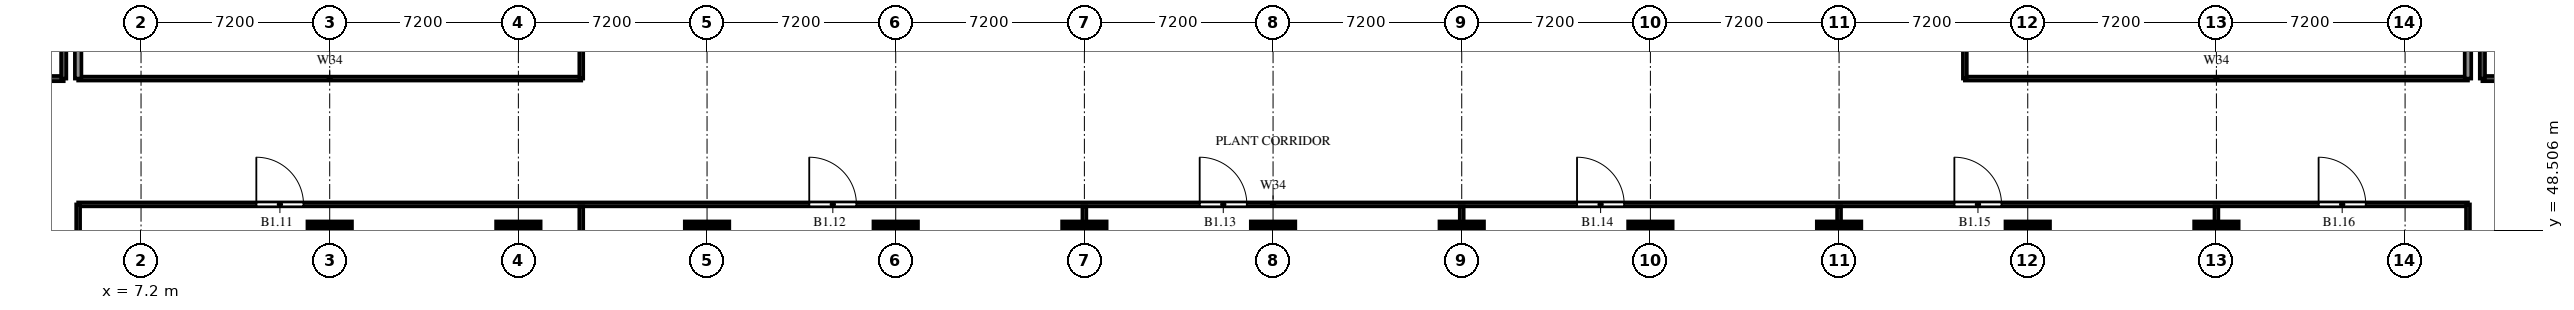
"""IFC4 building model, lengths in metres.
Left out: names, types, materials, properties, quantities, classifications, styles, units other than length and angle.
Written with IfcOpenShell. Run it as: python <this file> out.ifc"""

import sys

from ifc_helpers import new_model, si_unit, direction, frame, frame_2d, origin, origin_2d, place, context, subcontext, project, spatial, rectangle, extrude, source, transform, mapped, element, fill, save


model = new_model("IFC4")
c1 = context("Model", 3, precision=1e-05, world=origin(), true_north=direction((0.0, 1.0)))
c2 = subcontext(c1, "Body", "Model", "MODEL_VIEW")
j1 = project(units=[si_unit("LENGTHUNIT", "METRE"), si_unit("PLANEANGLEUNIT", "RADIAN")], contexts=[c1])
p1 = place(None, origin())
s1 = spatial("IfcSite", under=j1, at=p1, CompositionType="ELEMENT")
p2 = place(p1, origin())
s2 = spatial("IfcBuilding", under=s1, at=p2, CompositionType="ELEMENT")
p3 = place(p2, frame((0.0, 0.0, -5.4)))
s3 = spatial("IfcBuildingStorey", under=s2, at=p3, CompositionType="ELEMENT", Elevation=-5.4)
m1 = source(origin(), c2, "Body", "SweptSolid", [
    extrude(rectangle(XDim=1.7, YDim=1.7, at=origin_2d()), origin(), (0.0, 0.0, 1.0), 5.0),
])
for number, where, z_axis, x_axis in (
    (1, (14.4, 48.0, 0.0), (0.0, 0.0, 1.0), (1.0, 0.0, 0.0)),
    (2, (21.6, 48.0, 0.0), (0.0, 0.0, 1.0), (1.0, 0.0, 0.0)),
    (3, (28.8, 48.0, 0.0), (0.0, 0.0, 1.0), (1.0, 0.0, 0.0)),
    (4, (36.0, 48.0, 0.0), (0.0, 0.0, 1.0), (1.0, 0.0, 0.0)),
    (5, (43.2, 48.0, 0.0), (0.0, 0.0, 1.0), (1.0, 0.0, 0.0)),
    (6, (50.4, 48.0, 0.0), (0.0, 0.0, 1.0), (1.0, 0.0, 0.0)),
    (7, (57.6, 48.0, 0.0), (0.0, 0.0, 1.0), (1.0, 0.0, 0.0)),
    (8, (64.8, 48.0, 0.0), (0.0, 0.0, 1.0), (1.0, 0.0, 0.0)),
    (9, (72.0, 48.0, 0.0), (0.0, 0.0, 1.0), (1.0, 0.0, 0.0)),
    (10, (79.2, 48.0, 0.0), (0.0, 0.0, 1.0), (1.0, 0.0, 0.0)),
    (11, (86.4, 48.0, 0.0), (0.0, 0.0, 1.0), (1.0, 0.0, 0.0)),
):
    element("IfcColumn", number, at=place(p3, frame(where, z_axis=z_axis, x_axis=x_axis)), inside=s3, PredefinedType="COLUMN", context=c2, shape_type="MappedRepresentation", body=[
        mapped(m1, transform((0.0, 0.0, 0.0))),
    ])
p4 = place(p3, frame((4.8, 49.5, 0.0), z_axis=(0.0, 0.0, 1.0), x_axis=(1.0, 0.0, 0.0)))
e12 = element("IfcWall", 12, at=p4, inside=s3, PredefinedType="PARTITIONING", context=c2, shape_type="SweptSolid", body=[
    extrude(rectangle(XDim=91.2, YDim=0.15, at=frame_2d((45.6, 0.0))), origin(), (0.0, 0.0, 1.0), 3.8),
])
p5 = place(p4, frame((6.8, 0.0, 0.0)))
e13 = element("IfcOpeningElement", 13, at=p5, cuts=e12, PredefinedType="OPENING", context=c2, shape_type="SweptSolid", body=[
    extrude(rectangle(XDim=1.8, YDim=2.4, at=frame_2d((0.9, 1.2))), frame((0.0, 0.085, 0.0), z_axis=(0.0, -1.0, 0.0), x_axis=(1.0, 0.0, 0.0)), (0.0, 0.0, 1.0), 0.17),
])
p6 = place(p4, frame((27.9, 0.0, 0.0)))
e14 = element("IfcOpeningElement", 14, at=p6, cuts=e12, PredefinedType="OPENING", context=c2, shape_type="SweptSolid", body=[
    extrude(rectangle(XDim=1.8, YDim=2.4, at=frame_2d((0.9, 1.2))), frame((0.0, 0.085, 0.0), z_axis=(0.0, -1.0, 0.0), x_axis=(1.0, 0.0, 0.0)), (0.0, 0.0, 1.0), 0.17),
])
p7 = place(p4, frame((42.8, 0.0, 0.0)))
e15 = element("IfcOpeningElement", 15, at=p7, cuts=e12, PredefinedType="OPENING", context=c2, shape_type="SweptSolid", body=[
    extrude(rectangle(XDim=1.8, YDim=2.4, at=frame_2d((0.9, 1.2))), frame((0.0, 0.085, 0.0), z_axis=(0.0, -1.0, 0.0), x_axis=(1.0, 0.0, 0.0)), (0.0, 0.0, 1.0), 0.17),
])
p8 = place(p4, frame((57.2, 0.0, 0.0)))
e16 = element("IfcOpeningElement", 16, at=p8, cuts=e12, PredefinedType="OPENING", context=c2, shape_type="SweptSolid", body=[
    extrude(rectangle(XDim=1.8, YDim=2.4, at=frame_2d((0.9, 1.2))), frame((0.0, 0.085, 0.0), z_axis=(0.0, -1.0, 0.0), x_axis=(1.0, 0.0, 0.0)), (0.0, 0.0, 1.0), 0.17),
])
p9 = place(p4, frame((71.6, 0.0, 0.0)))
e17 = element("IfcOpeningElement", 17, at=p9, cuts=e12, PredefinedType="OPENING", context=c2, shape_type="SweptSolid", body=[
    extrude(rectangle(XDim=1.8, YDim=2.4, at=frame_2d((0.9, 1.2))), frame((0.0, 0.085, 0.0), z_axis=(0.0, -1.0, 0.0), x_axis=(1.0, 0.0, 0.0)), (0.0, 0.0, 1.0), 0.17),
])
p10 = place(p4, frame((85.5, 0.0, 0.0)))
e18 = element("IfcOpeningElement", 18, at=p10, cuts=e12, PredefinedType="OPENING", context=c2, shape_type="SweptSolid", body=[
    extrude(rectangle(XDim=1.8, YDim=2.4, at=frame_2d((0.9, 1.2))), frame((0.0, 0.085, 0.0), z_axis=(0.0, -1.0, 0.0), x_axis=(1.0, 0.0, 0.0)), (0.0, 0.0, 1.0), 0.17),
])
for number, where, z_axis, x_axis in (
    (19, (4.8, 54.3, 0.0), (0.0, 0.0, 1.0), (1.0, 0.0, 0.0)),
    (20, (76.8, 54.3, 0.0), (0.0, 0.0, 1.0), (1.0, 0.0, 0.0)),
):
    element("IfcWall", number, at=place(p3, frame(where, z_axis=z_axis, x_axis=x_axis)), inside=s3, PredefinedType="PARTITIONING", context=c2, shape_type="SweptSolid", body=[
        extrude(rectangle(XDim=19.2, YDim=0.15, at=frame_2d((9.6, 0.0))), origin(), (0.0, 0.0, 1.0), 3.8),
    ])
p11 = place(p3, frame((0.0, 54.3, 0.0), z_axis=(0.0, 0.0, 1.0), x_axis=(1.0, 0.0, 0.0)))
e21 = element("IfcWall", 21, at=p11, inside=s3, PredefinedType="SOLIDWALL", context=c2, shape_type="SweptSolid", body=[
    extrude(rectangle(XDim=4.25, YDim=0.2, at=frame_2d((2.125, 0.0))), origin(), (0.0, 0.0, 1.0), 5.0),
])
p12 = place(p11, frame((2.025, 0.0, 0.0)))
e22 = element("IfcOpeningElement", 22, at=p12, cuts=e21, PredefinedType="OPENING", context=c2, shape_type="SweptSolid", body=[
    extrude(rectangle(XDim=1.1, YDim=2.1, at=frame_2d((0.55, 1.05))), frame((0.0, 0.11, 0.0), z_axis=(0.0, -1.0, 0.0), x_axis=(1.0, 0.0, 0.0)), (0.0, 0.0, 1.0), 0.22),
])
p13 = place(p3, frame((96.55, 54.3, 0.0), z_axis=(0.0, 0.0, 1.0), x_axis=(1.0, 0.0, 0.0)))
e23 = element("IfcWall", 23, at=p13, inside=s3, PredefinedType="SOLIDWALL", context=c2, shape_type="SweptSolid", body=[
    extrude(rectangle(XDim=4.25, YDim=0.2, at=frame_2d((2.125, 0.0))), origin(), (0.0, 0.0, 1.0), 5.0),
])
p14 = place(p13, frame((1.125, 0.0, 0.0)))
e24 = element("IfcOpeningElement", 24, at=p14, cuts=e23, PredefinedType="OPENING", context=c2, shape_type="SweptSolid", body=[
    extrude(rectangle(XDim=1.1, YDim=2.1, at=frame_2d((0.55, 1.05))), frame((0.0, 0.11, 0.0), z_axis=(0.0, -1.0, 0.0), x_axis=(1.0, 0.0, 0.0)), (0.0, 0.0, 1.0), 0.22),
])
p15 = place(p3, frame((4.25, 54.3, 0.0), z_axis=(0.0, 0.0, 1.0), x_axis=(0.0, 1.0, 0.0)))
e25 = element("IfcWall", 25, at=p15, inside=s3, PredefinedType="SOLIDWALL", context=c2, shape_type="SweptSolid", body=[
    extrude(rectangle(XDim=8.8, YDim=0.2, at=frame_2d((4.4, 0.0))), origin(), (0.0, 0.0, 1.0), 5.0),
])
p16 = place(p3, frame((4.8, 33.6, 0.0), z_axis=(0.0, 0.0, 1.0), x_axis=(0.0, 1.0, 0.0)))
e26 = element("IfcWall", 26, at=p16, inside=s3, PredefinedType="PARTITIONING", context=c2, shape_type="SweptSolid", body=[
    extrude(rectangle(XDim=15.9, YDim=0.15, at=frame_2d((7.95, 0.0))), origin(), (0.0, 0.0, 1.0), 3.8),
])
p17 = place(p3, frame((4.8, 54.3, 0.0), z_axis=(0.0, 0.0, 1.0), x_axis=(0.0, 1.0, 0.0)))
e27 = element("IfcWall", 27, at=p17, inside=s3, PredefinedType="SOLIDWALL", context=c2, shape_type="SweptSolid", body=[
    extrude(rectangle(XDim=32.1, YDim=0.25, at=frame_2d((16.05, 0.0))), origin(), (0.0, 0.0, 1.0), 2.2),
])
p18 = place(p3, frame((24.0, 33.675, 0.0), z_axis=(0.0, 0.0, 1.0), x_axis=(0.0, 1.0, 0.0)))
e28 = element("IfcWall", 28, at=p18, inside=s3, PredefinedType="PARTITIONING", context=c2, shape_type="SweptSolid", body=[
    extrude(rectangle(XDim=15.75, YDim=0.15, at=frame_2d((7.875, 0.0))), origin(), (0.0, 0.0, 1.0), 4.1),
])
p19 = place(p3, frame((24.0, 54.3, 0.0), z_axis=(0.0, 0.0, 1.0), x_axis=(0.0, 1.0, 0.0)))
e29 = element("IfcWall", 29, at=p19, inside=s3, PredefinedType="PARTITIONING", context=c2, shape_type="SweptSolid", body=[
    extrude(rectangle(XDim=31.9, YDim=0.15, at=frame_2d((15.95, 0.0))), origin(), (0.0, 0.0, 1.0), 3.8),
])
p20 = place(p19, frame((7.35, 0.0, 0.0)))
e30 = element("IfcOpeningElement", 30, at=p20, cuts=e29, PredefinedType="OPENING", context=c2, shape_type="SweptSolid", body=[
    extrude(rectangle(XDim=1.2, YDim=2.1, at=frame_2d((0.6, 1.05))), frame((0.0, 0.085, 0.0), z_axis=(0.0, -1.0, 0.0), x_axis=(1.0, 0.0, 0.0)), (0.0, 0.0, 1.0), 0.17),
])
p21 = place(p19, frame((23.4, 0.0, 0.0)))
e31 = element("IfcOpeningElement", 31, at=p21, cuts=e29, PredefinedType="OPENING", context=c2, shape_type="SweptSolid", body=[
    extrude(rectangle(XDim=1.2, YDim=2.1, at=frame_2d((0.6, 1.05))), frame((0.0, 0.085, 0.0), z_axis=(0.0, -1.0, 0.0), x_axis=(1.0, 0.0, 0.0)), (0.0, 0.0, 1.0), 0.17),
])
for number, where, z_axis, x_axis in (
    (32, (43.2, 33.675, 0.0), (0.0, 0.0, 1.0), (0.0, 1.0, 0.0)),
    (33, (57.6, 33.675, 0.0), (0.0, 0.0, 1.0), (0.0, 1.0, 0.0)),
    (34, (72.0, 33.675, 0.0), (0.0, 0.0, 1.0), (0.0, 1.0, 0.0)),
):
    element("IfcWall", number, at=place(p3, frame(where, z_axis=z_axis, x_axis=x_axis)), inside=s3, PredefinedType="PARTITIONING", context=c2, shape_type="SweptSolid", body=[
        extrude(rectangle(XDim=15.75, YDim=0.15, at=frame_2d((7.875, 0.0))), origin(), (0.0, 0.0, 1.0), 3.8),
    ])
p22 = place(p3, frame((76.8, 54.3, 0.0), z_axis=(0.0, 0.0, 1.0), x_axis=(0.0, 1.0, 0.0)))
e35 = element("IfcWall", 35, at=p22, inside=s3, PredefinedType="PARTITIONING", context=c2, shape_type="SweptSolid", body=[
    extrude(rectangle(XDim=31.9, YDim=0.15, at=frame_2d((15.95, 0.0))), origin(), (0.0, 0.0, 1.0), 3.8),
])
p23 = place(p22, frame((7.35, 0.0, 0.0)))
e36 = element("IfcOpeningElement", 36, at=p23, cuts=e35, PredefinedType="OPENING", context=c2, shape_type="SweptSolid", body=[
    extrude(rectangle(XDim=1.2, YDim=2.1, at=frame_2d((0.6, 1.05))), frame((0.0, 0.085, 0.0), z_axis=(0.0, -1.0, 0.0), x_axis=(1.0, 0.0, 0.0)), (0.0, 0.0, 1.0), 0.17),
])
p24 = place(p22, frame((23.4, 0.0, 0.0)))
e37 = element("IfcOpeningElement", 37, at=p24, cuts=e35, PredefinedType="OPENING", context=c2, shape_type="SweptSolid", body=[
    extrude(rectangle(XDim=1.2, YDim=2.1, at=frame_2d((0.6, 1.05))), frame((0.0, 0.085, 0.0), z_axis=(0.0, -1.0, 0.0), x_axis=(1.0, 0.0, 0.0)), (0.0, 0.0, 1.0), 0.17),
])
p25 = place(p3, frame((86.4, 33.675, 0.0), z_axis=(0.0, 0.0, 1.0), x_axis=(0.0, 1.0, 0.0)))
e38 = element("IfcWall", 38, at=p25, inside=s3, PredefinedType="PARTITIONING", context=c2, shape_type="SweptSolid", body=[
    extrude(rectangle(XDim=15.75, YDim=0.15, at=frame_2d((7.875, 0.0))), origin(), (0.0, 0.0, 1.0), 3.8),
])
p26 = place(p3, frame((96.0, 33.6, 0.0), z_axis=(0.0, 0.0, 1.0), x_axis=(0.0, 1.0, 0.0)))
e39 = element("IfcWall", 39, at=p26, inside=s3, PredefinedType="PARTITIONING", context=c2, shape_type="SweptSolid", body=[
    extrude(rectangle(XDim=15.9, YDim=0.15, at=frame_2d((7.95, 0.0))), origin(), (0.0, 0.0, 1.0), 3.8),
])
p27 = place(p3, frame((96.0, 54.3, 0.0), z_axis=(0.0, 0.0, 1.0), x_axis=(0.0, 1.0, 0.0)))
e40 = element("IfcWall", 40, at=p27, inside=s3, PredefinedType="SOLIDWALL", context=c2, shape_type="SweptSolid", body=[
    extrude(rectangle(XDim=32.1, YDim=0.25, at=frame_2d((16.05, 0.0))), origin(), (0.0, 0.0, 1.0), 2.2),
])
p28 = place(p3, frame((96.55, 54.3, 0.0), z_axis=(0.0, 0.0, 1.0), x_axis=(0.0, 1.0, 0.0)))
e41 = element("IfcWall", 41, at=p28, inside=s3, PredefinedType="SOLIDWALL", context=c2, shape_type="SweptSolid", body=[
    extrude(rectangle(XDim=8.8, YDim=0.2, at=frame_2d((4.4, 0.0))), origin(), (0.0, 0.0, 1.0), 5.0),
])
p29 = place(p5, origin())
e42 = element("IfcDoor", 42, at=p29, inside=s3, OperationType="DOUBLE_DOOR_SINGLE_SWING", PredefinedType="DOOR", context=c2, shape_type="SweptSolid", body=[
    extrude(rectangle(XDim=1.8, YDim=2.4, at=frame_2d((0.9, 1.2))), frame((0.0, 0.025, 0.0), z_axis=(0.0, -1.0, 0.0), x_axis=(1.0, 0.0, 0.0)), (0.0, 0.0, 1.0), 0.05),
])
fill(e13, e42)
p30 = place(p6, origin())
e43 = element("IfcDoor", 43, at=p30, inside=s3, OperationType="DOUBLE_DOOR_SINGLE_SWING", PredefinedType="DOOR", context=c2, shape_type="SweptSolid", body=[
    extrude(rectangle(XDim=1.8, YDim=2.4, at=frame_2d((0.9, 1.2))), frame((0.0, 0.025, 0.0), z_axis=(0.0, -1.0, 0.0), x_axis=(1.0, 0.0, 0.0)), (0.0, 0.0, 1.0), 0.05),
])
fill(e14, e43)
p31 = place(p7, origin())
e44 = element("IfcDoor", 44, at=p31, inside=s3, OperationType="DOUBLE_DOOR_SINGLE_SWING", PredefinedType="DOOR", context=c2, shape_type="SweptSolid", body=[
    extrude(rectangle(XDim=1.8, YDim=2.4, at=frame_2d((0.9, 1.2))), frame((0.0, 0.025, 0.0), z_axis=(0.0, -1.0, 0.0), x_axis=(1.0, 0.0, 0.0)), (0.0, 0.0, 1.0), 0.05),
])
fill(e15, e44)
p32 = place(p8, origin())
e45 = element("IfcDoor", 45, at=p32, inside=s3, OperationType="DOUBLE_DOOR_SINGLE_SWING", PredefinedType="DOOR", context=c2, shape_type="SweptSolid", body=[
    extrude(rectangle(XDim=1.8, YDim=2.4, at=frame_2d((0.9, 1.2))), frame((0.0, 0.025, 0.0), z_axis=(0.0, -1.0, 0.0), x_axis=(1.0, 0.0, 0.0)), (0.0, 0.0, 1.0), 0.05),
])
fill(e16, e45)
p33 = place(p9, origin())
e46 = element("IfcDoor", 46, at=p33, inside=s3, OperationType="DOUBLE_DOOR_SINGLE_SWING", PredefinedType="DOOR", context=c2, shape_type="SweptSolid", body=[
    extrude(rectangle(XDim=1.8, YDim=2.4, at=frame_2d((0.9, 1.2))), frame((0.0, 0.025, 0.0), z_axis=(0.0, -1.0, 0.0), x_axis=(1.0, 0.0, 0.0)), (0.0, 0.0, 1.0), 0.05),
])
fill(e17, e46)
p34 = place(p10, origin())
e47 = element("IfcDoor", 47, at=p34, inside=s3, OperationType="DOUBLE_DOOR_SINGLE_SWING", PredefinedType="DOOR", context=c2, shape_type="SweptSolid", body=[
    extrude(rectangle(XDim=1.8, YDim=2.4, at=frame_2d((0.9, 1.2))), frame((0.0, 0.025, 0.0), z_axis=(0.0, -1.0, 0.0), x_axis=(1.0, 0.0, 0.0)), (0.0, 0.0, 1.0), 0.05),
])
fill(e18, e47)
save(model, sys.argv[1])
